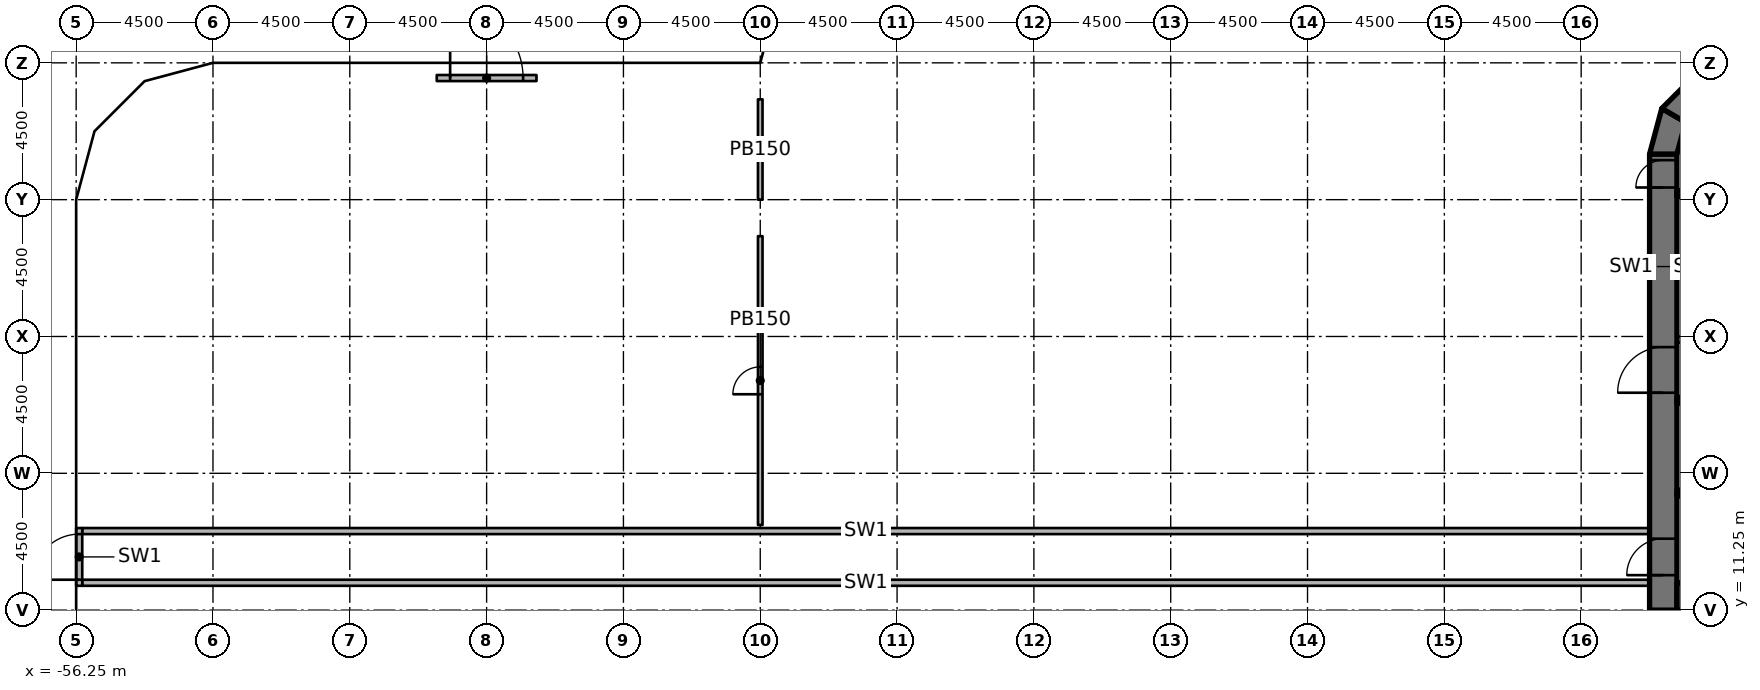
"""IFC4 building model, lengths in metres.
Left out: names, types, materials, properties, quantities, classifications, styles, units other than length and angle.
Written with IfcOpenShell. Run it as: python <this file> out.ifc"""

import sys

from ifc_helpers import new_model, si_unit, direction, frame, frame_2d, origin, origin_2d, place, context, subcontext, project, spatial, polyline, rectangle, outline, extrude, element, fill, save


model = new_model("IFC4")
c1 = context("Model", 3, precision=1e-05, world=origin(), true_north=direction((0.0, 1.0)))
c2 = subcontext(c1, "Body", "Model", "MODEL_VIEW")
j1 = project(units=[si_unit("LENGTHUNIT", "METRE"), si_unit("PLANEANGLEUNIT", "RADIAN")], contexts=[c1])
p1 = place(None, origin())
s1 = spatial("IfcSite", under=j1, at=p1, CompositionType="ELEMENT")
p2 = place(p1, origin())
s2 = spatial("IfcBuilding", under=s1, at=p2, CompositionType="ELEMENT")
p3 = place(p2, origin())
s3 = spatial("IfcBuildingStorey", under=s2, at=p3, CompositionType="ELEMENT", Elevation=0.0)
for number, where, z_axis, x_axis in (
    (1, (-55.65, 20.25, 0.0), (0.0, 0.0, 1.0), (1.0, 0.0, 0.0)),
    (2, (-51.15, 15.75, 0.0), (0.0, 0.0, 1.0), (1.0, 0.0, 0.0)),
    (3, (-51.75, 28.47, 0.0), (0.0, 0.0, 1.0), (1.0, 0.0, 0.0)),
    (4, (-46.65, 11.25, 0.0), (0.0, 0.0, 1.0), (1.0, 0.0, 0.0)),
    (5, (-47.25, 23.97, 0.0), (0.0, 0.0, 1.0), (1.0, 0.0, 0.0)),
    (6, (-42.75, 19.47, 0.0), (0.0, 0.0, 1.0), (1.0, 0.0, 0.0)),
    (7, (-38.25, 14.97, 0.0), (0.0, 0.0, 1.0), (1.0, 0.0, 0.0)),
    (8, (-38.25, 28.65, 0.0), (0.0, 0.0, 1.0), (1.0, 0.0, 0.0)),
    (9, (-33.75, 24.15, 0.0), (0.0, 0.0, 1.0), (1.0, 0.0, 0.0)),
    (10, (-33.15, 28.65, 0.0), (0.0, 0.0, 1.0), (1.0, 0.0, 0.0)),
    (11, (-29.25, 19.65, 0.0), (0.0, 0.0, 1.0), (1.0, 0.0, 0.0)),
    (12, (-28.65, 24.15, 0.0), (0.0, 0.0, 1.0), (1.0, 0.0, 0.0)),
    (13, (-24.75, 15.15, 0.0), (0.0, 0.0, 1.0), (1.0, 0.0, 0.0)),
    (14, (-24.15, 19.65, 0.0), (0.0, 0.0, 1.0), (1.0, 0.0, 0.0)),
    (15, (-24.15, 28.65, 0.0), (0.0, 0.0, 1.0), (1.0, 0.0, 0.0)),
    (16, (-19.65, 15.15, 0.0), (0.0, 0.0, 1.0), (1.0, 0.0, 0.0)),
    (17, (-19.65, 24.15, 0.0), (0.0, 0.0, 1.0), (1.0, 0.0, 0.0)),
    (18, (-15.15, 19.65, 0.0), (0.0, 0.0, 1.0), (1.0, 0.0, 0.0)),
    (19, (-10.65, 15.15, 0.0), (0.0, 0.0, 1.0), (1.0, 0.0, 0.0)),
    (20, (-10.65, 29.25, 0.0), (0.0, 0.0, 1.0), (1.0, 0.0, 0.0)),
    (21, (-6.25, 10.75, 0.0), (0.0, 0.0, 1.0), (1.0, 0.0, 0.0)),
    (22, (-6.25, 15.75, 0.0), (0.0, 0.0, 1.0), (1.0, 0.0, 0.0)),
    (23, (-6.25, 20.25, 0.0), (0.0, 0.0, 1.0), (1.0, 0.0, 0.0)),
    (24, (-6.25, 24.65, 0.0), (0.0, 0.0, 1.0), (1.0, 0.0, 0.0)),
    (25, (-6.25, 26.7, 0.0), (0.0, 0.0, 1.0), (1.0, 0.0, 0.0)),
):
    element("IfcColumn", number, at=place(p3, frame(where, z_axis=z_axis, x_axis=x_axis)), inside=s3, PredefinedType="COLUMN", context=c2, shape_type="SweptSolid", body=[
        extrude(rectangle(XDim=1.2, YDim=1.2, at=origin_2d()), origin(), (0.0, 0.0, 1.0), 6.55),
    ])
p4 = place(p3, frame((-4.05, 11.25, 0.0), z_axis=(0.0, 0.0, 1.0), x_axis=(0.0, 1.0, 0.0)))
e26 = element("IfcWall", 26, at=p4, inside=s3, PredefinedType="SHEAR", context=c2, shape_type="SweptSolid", body=[
    extrude(rectangle(XDim=15.0, YDim=0.9, at=frame_2d((7.5, 0.0))), origin(), (0.0, 0.0, 1.0), 7.0),
])
p5 = place(p4, frame((7.15, 0.0, 0.0)))
e27 = element("IfcOpeningElement", 27, at=p5, cuts=e26, PredefinedType="OPENING", context=c2, shape_type="SweptSolid", body=[
    extrude(rectangle(XDim=1.5, YDim=2.3, at=frame_2d((0.75, 1.15))), frame((0.0, 0.46, 0.0), z_axis=(0.0, -1.0, 0.0), x_axis=(1.0, 0.0, 0.0)), (0.0, 0.0, 1.0), 0.92),
])
p6 = place(p4, frame((13.9, 0.0, 0.0)))
e28 = element("IfcOpeningElement", 28, at=p6, cuts=e26, PredefinedType="OPENING", context=c2, shape_type="SweptSolid", body=[
    extrude(rectangle(XDim=0.9, YDim=2.1, at=frame_2d((0.45, 1.05))), frame((0.0, 0.46, 0.0), z_axis=(0.0, -1.0, 0.0), x_axis=(1.0, 0.0, 0.0)), (0.0, 0.0, 1.0), 0.92),
])
p7 = place(p4, frame((1.15, 0.0, 0.0)))
e29 = element("IfcOpeningElement", 29, at=p7, cuts=e26, PredefinedType="OPENING", context=c2, shape_type="SweptSolid", body=[
    extrude(rectangle(XDim=1.2, YDim=2.1, at=frame_2d((0.6, 1.05))), frame((0.0, 0.46, 0.0), z_axis=(0.0, -1.0, 0.0), x_axis=(1.0, 0.0, 0.0)), (0.0, 0.0, 1.0), 0.92),
])
p8 = place(p3, frame((-3.6, 11.7, 0.0), z_axis=(0.0, 0.0, 1.0), x_axis=(1.0, 0.0, 0.0)))
e30 = element("IfcWall", 30, at=p8, inside=s3, PredefinedType="SHEAR", context=c2, shape_type="SweptSolid", body=[
    extrude(rectangle(XDim=7.2, YDim=0.9, at=frame_2d((3.6, 0.0))), origin(), (0.0, 0.0, 1.0), 7.0),
])
p9 = place(p3, origin())
e31 = element("IfcWall", 31, at=p9, inside=s3, PredefinedType="SHEAR", context=c2, shape_type="SweptSolid", body=[
    extrude(outline(polyline([(-4.5, 26.25), (-4.098, 27.75), (-3.319, 27.3), (-3.6, 26.25), (-4.5, 26.25)])), origin(), (0.0, 0.0, 1.0), 7.0),
])
p10 = place(p3, origin())
e32 = element("IfcWall", 32, at=p10, inside=s3, PredefinedType="SHEAR", context=c2, shape_type="SweptSolid", body=[
    extrude(outline(polyline([(-4.098, 27.75), (-3.0, 28.848), (-2.55, 28.069), (-3.319, 27.3), (-4.098, 27.75)])), origin(), (0.0, 0.0, 1.0), 7.0),
])
p11 = place(p3, frame((-44.39, 28.75, 0.0), z_axis=(0.0, 0.0, 1.0), x_axis=(1.0, 0.0, 0.0)))
e33 = element("IfcWall", 33, at=p11, inside=s3, PredefinedType="SOLIDWALL", context=c2, shape_type="SweptSolid", body=[
    extrude(rectangle(XDim=3.28, YDim=0.2, at=frame_2d((1.64, 0.0))), origin(), (0.0, 0.0, 1.0), 5.6),
])
p12 = place(p11, frame((0.44, 0.0, 0.0)))
e34 = element("IfcOpeningElement", 34, at=p12, cuts=e33, PredefinedType="OPENING", context=c2, shape_type="SweptSolid", body=[
    extrude(rectangle(XDim=2.4, YDim=2.7, at=frame_2d((1.2, 1.35))), frame((0.0, 0.11, 0.0), z_axis=(0.0, -1.0, 0.0), x_axis=(1.0, 0.0, 0.0)), (0.0, 0.0, 1.0), 0.22),
])
for number, where, z_axis, x_axis in (
    (35, (-3.6, 24.95, 0.0), (0.0, 0.0, 1.0), (1.0, 0.0, 0.0)),
    (36, (-3.6, 18.15, 0.0), (0.0, 0.0, 1.0), (1.0, 0.0, 0.0)),
    (37, (-3.6, 15.1, 0.0), (0.0, 0.0, 1.0), (1.0, 0.0, 0.0)),
):
    element("IfcWall", number, at=place(p3, frame(where, z_axis=z_axis, x_axis=x_axis)), inside=s3, PredefinedType="SHEAR", context=c2, shape_type="SweptSolid", body=[
        extrude(rectangle(XDim=7.2, YDim=0.2, at=frame_2d((3.6, 0.0))), origin(), (0.0, 0.0, 1.0), 6.55),
    ])
p13 = place(p3, frame((-3.6, 20.15, 0.0), z_axis=(0.0, 0.0, 1.0), x_axis=(1.0, 0.0, 0.0)))
e38 = element("IfcWall", 38, at=p13, inside=s3, PredefinedType="PARTITIONING", context=c2, shape_type="SweptSolid", body=[
    extrude(rectangle(XDim=2.7, YDim=0.2, at=frame_2d((1.35, 0.0))), origin(), (0.0, 0.0, 1.0), 6.55),
])
p14 = place(p3, frame((-3.6, 22.55, 0.0), z_axis=(0.0, 0.0, 1.0), x_axis=(1.0, 0.0, 0.0)))
e39 = element("IfcWall", 39, at=p14, inside=s3, PredefinedType="PARTITIONING", context=c2, shape_type="SweptSolid", body=[
    extrude(rectangle(XDim=2.5, YDim=0.2, at=frame_2d((1.25, 0.0))), origin(), (0.0, 0.0, 1.0), 6.55),
])
for number, where, z_axis, x_axis in (
    (40, (-4.5, 12.15, 0.0), (0.0, 0.0, 1.0), (-1.0, 0.0, 0.0)),
    (41, (-4.5, 13.85, 0.0), (0.0, 0.0, 1.0), (-1.0, 0.0, 0.0)),
):
    element("IfcWall", number, at=place(p3, frame(where, z_axis=z_axis, x_axis=x_axis)), inside=s3, PredefinedType="PARTITIONING", context=c2, shape_type="SweptSolid", body=[
        extrude(rectangle(XDim=51.55, YDim=0.2, at=frame_2d((25.775, 0.0))), origin(), (0.0, 0.0, 1.0), 6.55),
    ])
p15 = place(p3, frame((-56.15, 12.05, 0.0), z_axis=(0.0, 0.0, 1.0), x_axis=(0.0, 1.0, 0.0)))
e42 = element("IfcWall", 42, at=p15, inside=s3, PredefinedType="PARTITIONING", context=c2, shape_type="SweptSolid", body=[
    extrude(rectangle(XDim=1.9, YDim=0.2, at=frame_2d((0.95, 0.0))), origin(), (0.0, 0.0, 1.0), 6.55),
])
p16 = place(p15, frame((0.2, 0.0, 0.0)))
e43 = element("IfcOpeningElement", 43, at=p16, cuts=e42, PredefinedType="OPENING", context=c2, shape_type="SweptSolid", body=[
    extrude(rectangle(XDim=1.5, YDim=2.1, at=frame_2d((0.75, 1.05))), frame((0.0, 0.11, 0.0), z_axis=(0.0, -1.0, 0.0), x_axis=(1.0, 0.0, 0.0)), (0.0, 0.0, 1.0), 0.22),
])
p17 = place(p3, frame((-33.75, 28.05, 0.0), z_axis=(0.0, 0.0, 1.0), x_axis=(0.0, -1.0, 0.0)))
e44 = element("IfcWall", 44, at=p17, inside=s3, PredefinedType="PARTITIONING", context=c2, shape_type="SweptSolid", body=[
    extrude(rectangle(XDim=3.3, YDim=0.15, at=frame_2d((1.65, 0.0))), origin(), (0.0, 0.0, 1.0), 6.55),
])
p18 = place(p3, frame((-33.75, 14.05, 0.0), z_axis=(0.0, 0.0, 1.0), x_axis=(0.0, 1.0, 0.0)))
e45 = element("IfcWall", 45, at=p18, inside=s3, PredefinedType="PARTITIONING", context=c2, shape_type="SweptSolid", body=[
    extrude(rectangle(XDim=9.5, YDim=0.15, at=frame_2d((4.75, 0.0))), origin(), (0.0, 0.0, 1.0), 6.55),
])
p19 = place(p18, frame((4.3, 0.0, 0.0)))
e46 = element("IfcOpeningElement", 46, at=p19, cuts=e45, PredefinedType="OPENING", context=c2, shape_type="SweptSolid", body=[
    extrude(rectangle(XDim=0.9, YDim=2.1, at=frame_2d((0.45, 1.05))), frame((0.0, 0.085, 0.0), z_axis=(0.0, -1.0, 0.0), x_axis=(1.0, 0.0, 0.0)), (0.0, 0.0, 1.0), 0.17),
])
p20 = place(p12, origin())
e47 = element("IfcDoor", 47, at=p20, inside=s3, OperationType="SINGLE_SWING_LEFT", PredefinedType="DOOR", context=c2, shape_type="SweptSolid", body=[
    extrude(rectangle(XDim=2.4, YDim=2.7, at=frame_2d((1.2, 1.35))), frame((0.0, 0.025, 0.0), z_axis=(0.0, -1.0, 0.0), x_axis=(1.0, 0.0, 0.0)), (0.0, 0.0, 1.0), 0.05),
])
fill(e34, e47)
p21 = place(p5, origin())
e48 = element("IfcDoor", 48, at=p21, inside=s3, OperationType="DOUBLE_DOOR_SINGLE_SWING", PredefinedType="DOOR", context=c2, shape_type="SweptSolid", body=[
    extrude(rectangle(XDim=1.5, YDim=2.3, at=frame_2d((0.75, 1.15))), frame((0.0, 0.025, 0.0), z_axis=(0.0, -1.0, 0.0), x_axis=(1.0, 0.0, 0.0)), (0.0, 0.0, 1.0), 0.05),
])
fill(e27, e48)
p22 = place(p6, origin())
e49 = element("IfcDoor", 49, at=p22, inside=s3, OperationType="SINGLE_SWING_LEFT", PredefinedType="DOOR", context=c2, shape_type="SweptSolid", body=[
    extrude(rectangle(XDim=0.9, YDim=2.1, at=frame_2d((0.45, 1.05))), frame((0.0, 0.025, 0.0), z_axis=(0.0, -1.0, 0.0), x_axis=(1.0, 0.0, 0.0)), (0.0, 0.0, 1.0), 0.05),
])
fill(e28, e49)
p23 = place(p7, origin())
e50 = element("IfcDoor", 50, at=p23, inside=s3, OperationType="SINGLE_SWING_LEFT", PredefinedType="DOOR", context=c2, shape_type="SweptSolid", body=[
    extrude(rectangle(XDim=1.2, YDim=2.1, at=frame_2d((0.6, 1.05))), frame((0.0, 0.025, 0.0), z_axis=(0.0, -1.0, 0.0), x_axis=(1.0, 0.0, 0.0)), (0.0, 0.0, 1.0), 0.05),
])
fill(e29, e50)
p24 = place(p16, origin())
e51 = element("IfcDoor", 51, at=p24, inside=s3, OperationType="DOUBLE_DOOR_DOUBLE_SWING", PredefinedType="DOOR", context=c2, shape_type="SweptSolid", body=[
    extrude(rectangle(XDim=1.5, YDim=2.1, at=frame_2d((0.75, 1.05))), frame((0.0, 0.025, 0.0), z_axis=(0.0, -1.0, 0.0), x_axis=(1.0, 0.0, 0.0)), (0.0, 0.0, 1.0), 0.05),
])
fill(e43, e51)
p25 = place(p19, origin())
e52 = element("IfcDoor", 52, at=p25, inside=s3, OperationType="SINGLE_SWING_LEFT", PredefinedType="DOOR", context=c2, shape_type="SweptSolid", body=[
    extrude(rectangle(XDim=0.9, YDim=2.1, at=frame_2d((0.45, 1.05))), frame((0.0, 0.025, 0.0), z_axis=(0.0, -1.0, 0.0), x_axis=(1.0, 0.0, 0.0)), (0.0, 0.0, 1.0), 0.05),
])
fill(e46, e52)
save(model, sys.argv[1])
